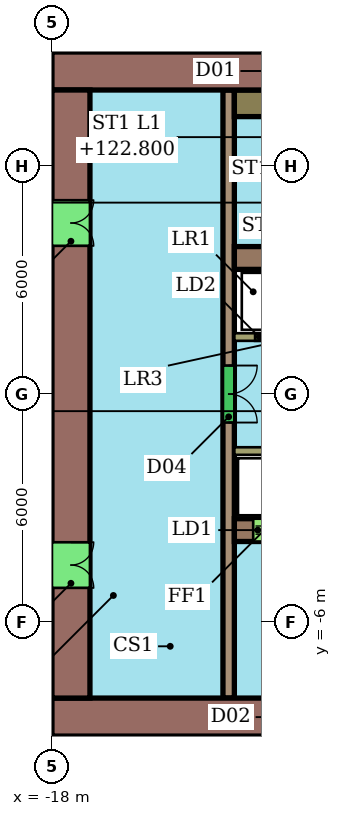
"""IFC4 building model, lengths in metres.
Left out: names, types, materials, properties, quantities, classifications, styles, units other than length and angle.
Written with IfcOpenShell. Run it as: python <this file> out.ifc"""

import sys

from ifc_helpers import new_model, si_unit, direction, frame, frame_2d, origin, place, context, subcontext, project, spatial, rectangle, extrude, element, fill, save


model = new_model("IFC4")
c1 = context("Model", 3, precision=1e-05, world=origin(), true_north=direction((0.0, 1.0)))
c2 = subcontext(c1, "Body", "Model", "MODEL_VIEW")
j1 = project(units=[si_unit("LENGTHUNIT", "METRE"), si_unit("PLANEANGLEUNIT", "RADIAN")], contexts=[c1])
p1 = place(None, origin())
s1 = spatial("IfcSite", under=j1, at=p1, CompositionType="ELEMENT")
p2 = place(p1, origin())
s2 = spatial("IfcBuilding", under=s1, at=p2, CompositionType="ELEMENT")
p3 = place(p2, frame((0.0, 0.0, 121.0)))
s3 = spatial("IfcBuildingStorey", under=s2, at=p3, CompositionType="ELEMENT", Elevation=121.0)
p4 = place(p3, frame((-6.0, 8.5, 0.0), z_axis=(0.0, 0.0, 1.0), x_axis=(-1.0, 0.0, 0.0)))
e1 = element("IfcWall", 1, at=p4, inside=s3, PredefinedType="SHEAR", context=c2, shape_type="SweptSolid", body=[
    extrude(rectangle(XDim=12.0, YDim=1.0, at=frame_2d((6.0, 0.0))), origin(), (0.0, 0.0, 1.0), 3.3),
])
p5 = place(p4, frame((5.2, 0.0, 0.0)))
e2 = element("IfcOpeningElement", 2, at=p5, cuts=e1, PredefinedType="OPENING", context=c2, shape_type="SweptSolid", body=[
    extrude(rectangle(XDim=1.2, YDim=2.1, at=frame_2d((0.6, 1.05))), frame((0.0, 0.51, 0.0), z_axis=(0.0, -1.0, 0.0), x_axis=(1.0, 0.0, 0.0)), (0.0, 0.0, 1.0), 1.02),
])
p6 = place(p3, frame((-18.0, -8.5, 0.0), z_axis=(0.0, 0.0, 1.0), x_axis=(1.0, 0.0, 0.0)))
e3 = element("IfcWall", 3, at=p6, inside=s3, PredefinedType="SHEAR", context=c2, shape_type="SweptSolid", body=[
    extrude(rectangle(XDim=24.0, YDim=1.0, at=frame_2d((12.0, 0.0))), origin(), (0.0, 0.0, 1.0), 3.3),
])
p7 = place(p6, frame((6.0, 0.0, 0.0)))
e4 = element("IfcOpeningElement", 4, at=p7, cuts=e3, PredefinedType="OPENING", context=c2, shape_type="SweptSolid", body=[
    extrude(rectangle(XDim=1.2, YDim=2.1, at=frame_2d((0.6, 1.05))), frame((0.0, 0.51, 0.0), z_axis=(0.0, -1.0, 0.0), x_axis=(1.0, 0.0, 0.0)), (0.0, 0.0, 1.0), 1.02),
])
p8 = place(p3, frame((-17.5, 8.0, 0.0), z_axis=(0.0, 0.0, 1.0), x_axis=(0.0, -1.0, 0.0)))
e5 = element("IfcWall", 5, at=p8, inside=s3, PredefinedType="SHEAR", context=c2, shape_type="SweptSolid", body=[
    extrude(rectangle(XDim=16.0, YDim=1.0, at=frame_2d((8.0, 0.0))), origin(), (0.0, 0.0, 1.0), 3.3),
])
p9 = place(p8, frame((11.9, 0.0, 0.0)))
e6 = element("IfcOpeningElement", 6, at=p9, cuts=e5, PredefinedType="OPENING", context=c2, shape_type="SweptSolid", body=[
    extrude(rectangle(XDim=1.2, YDim=2.1, at=frame_2d((0.6, 1.05))), frame((0.0, 0.51, 0.0), z_axis=(0.0, -1.0, 0.0), x_axis=(1.0, 0.0, 0.0)), (0.0, 0.0, 1.0), 1.02),
])
p10 = place(p8, frame((2.9, 0.0, 0.0)))
e7 = element("IfcOpeningElement", 7, at=p10, cuts=e5, PredefinedType="OPENING", context=c2, shape_type="SweptSolid", body=[
    extrude(rectangle(XDim=1.2, YDim=2.1, at=frame_2d((0.6, 1.05))), frame((0.0, 0.51, 0.0), z_axis=(0.0, -1.0, 0.0), x_axis=(1.0, 0.0, 0.0)), (0.0, 0.0, 1.0), 1.02),
])
p11 = place(p3, frame((-13.2, 3.58, 0.0), z_axis=(0.0, 0.0, 1.0), x_axis=(1.0, 0.0, 0.0)))
e8 = element("IfcWall", 8, at=p11, inside=s3, PredefinedType="SHEAR", context=c2, shape_type="SweptSolid", body=[
    extrude(rectangle(XDim=7.2, YDim=0.6, at=frame_2d((3.6, 0.0))), origin(), (0.0, 0.0, 1.0), 3.3),
])
p12 = place(p3, frame((-13.2, -3.58, 0.0), z_axis=(0.0, 0.0, 1.0), x_axis=(1.0, 0.0, 0.0)))
e9 = element("IfcWall", 9, at=p12, inside=s3, PredefinedType="SHEAR", context=c2, shape_type="SweptSolid", body=[
    extrude(rectangle(XDim=7.2, YDim=0.6, at=frame_2d((3.6, 0.0))), origin(), (0.0, 0.0, 1.0), 3.3),
])
p13 = place(p12, frame((0.496, 0.0, 0.0)))
e10 = element("IfcOpeningElement", 10, at=p13, cuts=e9, PredefinedType="OPENING", context=c2, shape_type="SweptSolid", body=[
    extrude(rectangle(XDim=1.2, YDim=2.1, at=frame_2d((0.6, 1.05))), frame((0.0, 0.31, 0.0), z_axis=(0.0, -1.0, 0.0), x_axis=(1.0, 0.0, 0.0)), (0.0, 0.0, 1.0), 0.62),
])
p14 = place(p12, frame((2.938, 0.0, 0.0)))
e11 = element("IfcOpeningElement", 11, at=p14, cuts=e9, PredefinedType="OPENING", context=c2, shape_type="SweptSolid", body=[
    extrude(rectangle(XDim=1.2, YDim=2.1, at=frame_2d((0.6, 1.05))), frame((0.0, 0.31, 0.0), z_axis=(0.0, -1.0, 0.0), x_axis=(1.0, 0.0, 0.0)), (0.0, 0.0, 1.0), 0.62),
])
p15 = place(p3, frame((-13.35, 8.0, 0.0), z_axis=(0.0, 0.0, 1.0), x_axis=(0.0, -1.0, 0.0)))
e12 = element("IfcWall", 12, at=p15, inside=s3, PredefinedType="SHEAR", context=c2, shape_type="SweptSolid", body=[
    extrude(rectangle(XDim=16.0, YDim=0.3, at=frame_2d((8.0, 0.0))), origin(), (0.0, 0.0, 1.0), 3.3),
])
p16 = place(p15, frame((7.25, 0.0, 0.0)))
e13 = element("IfcOpeningElement", 13, at=p16, cuts=e12, PredefinedType="OPENING", context=c2, shape_type="SweptSolid", body=[
    extrude(rectangle(XDim=1.5, YDim=2.1, at=frame_2d((0.75, 1.05))), frame((0.0, 0.16, 0.0), z_axis=(0.0, -1.0, 0.0), x_axis=(1.0, 0.0, 0.0)), (0.0, 0.0, 1.0), 0.32),
])
p17 = place(p3, frame((-13.2, 1.5, 0.0), z_axis=(0.0, 0.0, 1.0), x_axis=(1.0, 0.0, 0.0)))
e14 = element("IfcWall", 14, at=p17, inside=s3, PredefinedType="SHEAR", context=c2, shape_type="SweptSolid", body=[
    extrude(rectangle(XDim=14.4, YDim=0.2, at=frame_2d((7.2, 0.0))), origin(), (0.0, 0.0, 1.0), 3.3),
])
p18 = place(p17, frame((0.546, 0.0, 0.0)))
e15 = element("IfcOpeningElement", 15, at=p18, cuts=e14, PredefinedType="OPENING", context=c2, shape_type="SweptSolid", body=[
    extrude(rectangle(XDim=1.1, YDim=2.1, at=frame_2d((0.55, 1.05))), frame((0.0, 0.11, 0.0), z_axis=(0.0, -1.0, 0.0), x_axis=(1.0, 0.0, 0.0)), (0.0, 0.0, 1.0), 0.22),
])
p19 = place(p17, frame((2.988, 0.0, 0.0)))
e16 = element("IfcOpeningElement", 16, at=p19, cuts=e14, PredefinedType="OPENING", context=c2, shape_type="SweptSolid", body=[
    extrude(rectangle(XDim=1.1, YDim=2.1, at=frame_2d((0.55, 1.05))), frame((0.0, 0.11, 0.0), z_axis=(0.0, -1.0, 0.0), x_axis=(1.0, 0.0, 0.0)), (0.0, 0.0, 1.0), 0.22),
])
p20 = place(p17, frame((5.429, 0.0, 0.0)))
e17 = element("IfcOpeningElement", 17, at=p20, cuts=e14, PredefinedType="OPENING", context=c2, shape_type="SweptSolid", body=[
    extrude(rectangle(XDim=1.1, YDim=2.1, at=frame_2d((0.55, 1.05))), frame((0.0, 0.11, 0.0), z_axis=(0.0, -1.0, 0.0), x_axis=(1.0, 0.0, 0.0)), (0.0, 0.0, 1.0), 0.22),
])
p21 = place(p17, frame((7.871, 0.0, 0.0)))
e18 = element("IfcOpeningElement", 18, at=p21, cuts=e14, PredefinedType="OPENING", context=c2, shape_type="SweptSolid", body=[
    extrude(rectangle(XDim=1.1, YDim=2.1, at=frame_2d((0.55, 1.05))), frame((0.0, 0.11, 0.0), z_axis=(0.0, -1.0, 0.0), x_axis=(1.0, 0.0, 0.0)), (0.0, 0.0, 1.0), 0.22),
])
p22 = place(p17, frame((10.21, 0.0, 0.0)))
e19 = element("IfcOpeningElement", 19, at=p22, cuts=e14, PredefinedType="OPENING", context=c2, shape_type="SweptSolid", body=[
    extrude(rectangle(XDim=1.0, YDim=2.1, at=frame_2d((0.5, 1.05))), frame((0.0, 0.11, 0.0), z_axis=(0.0, -1.0, 0.0), x_axis=(1.0, 0.0, 0.0)), (0.0, 0.0, 1.0), 0.22),
])
p23 = place(p17, frame((13.35, 0.0, 0.0)))
e20 = element("IfcOpeningElement", 20, at=p23, cuts=e14, PredefinedType="OPENING", context=c2, shape_type="SweptSolid", body=[
    extrude(rectangle(XDim=0.9, YDim=2.1, at=frame_2d((0.45, 1.05))), frame((0.0, 0.11, 0.0), z_axis=(0.0, -1.0, 0.0), x_axis=(1.0, 0.0, 0.0)), (0.0, 0.0, 1.0), 0.22),
])
p24 = place(p3, frame((1.2, -1.5, 0.0), z_axis=(0.0, 0.0, 1.0), x_axis=(-1.0, 0.0, 0.0)))
e21 = element("IfcWall", 21, at=p24, inside=s3, PredefinedType="SHEAR", context=c2, shape_type="SweptSolid", body=[
    extrude(rectangle(XDim=14.4, YDim=0.2, at=frame_2d((7.2, 0.0))), origin(), (0.0, 0.0, 1.0), 3.3),
])
p25 = place(p24, frame((7.821, 0.0, 0.0)))
e22 = element("IfcOpeningElement", 22, at=p25, cuts=e21, PredefinedType="OPENING", context=c2, shape_type="SweptSolid", body=[
    extrude(rectangle(XDim=1.2, YDim=2.1, at=frame_2d((0.6, 1.05))), frame((0.0, 0.11, 0.0), z_axis=(0.0, -1.0, 0.0), x_axis=(1.0, 0.0, 0.0)), (0.0, 0.0, 1.0), 0.22),
])
p26 = place(p24, frame((0.15, 0.0, 0.0)))
e23 = element("IfcOpeningElement", 23, at=p26, cuts=e21, PredefinedType="OPENING", context=c2, shape_type="SweptSolid", body=[
    extrude(rectangle(XDim=0.9, YDim=2.1, at=frame_2d((0.45, 1.05))), frame((0.0, 0.11, 0.0), z_axis=(0.0, -1.0, 0.0), x_axis=(1.0, 0.0, 0.0)), (0.0, 0.0, 1.0), 0.22),
])
p27 = place(p3, frame((-13.2, 7.65, 0.0), z_axis=(0.0, 0.0, 1.0), x_axis=(1.0, 0.0, 0.0)))
e24 = element("IfcWall", 24, at=p27, inside=s3, PredefinedType="SHEAR", context=c2, shape_type="SweptSolid", body=[
    extrude(rectangle(XDim=0.8, YDim=0.7, at=frame_2d((0.4, 0.0))), origin(), (0.0, 0.0, 1.0), 3.3),
])
p28 = place(p9, origin())
e25 = element("IfcDoor", 25, at=p28, inside=s3, OperationType="DOUBLE_DOOR_SINGLE_SWING", PredefinedType="NOTDEFINED", context=c2, shape_type="SweptSolid", body=[
    extrude(rectangle(XDim=1.2, YDim=2.1, at=frame_2d((0.6, 1.05))), frame((0.0, 0.025, 0.0), z_axis=(0.0, -1.0, 0.0), x_axis=(1.0, 0.0, 0.0)), (0.0, 0.0, 1.0), 0.05),
])
fill(e6, e25)
p29 = place(p10, origin())
e26 = element("IfcDoor", 26, at=p29, inside=s3, OperationType="DOUBLE_DOOR_SINGLE_SWING", PredefinedType="NOTDEFINED", context=c2, shape_type="SweptSolid", body=[
    extrude(rectangle(XDim=1.2, YDim=2.1, at=frame_2d((0.6, 1.05))), frame((0.0, 0.025, 0.0), z_axis=(0.0, -1.0, 0.0), x_axis=(1.0, 0.0, 0.0)), (0.0, 0.0, 1.0), 0.05),
])
fill(e7, e26)
p30 = place(p13, origin())
e27 = element("IfcDoor", 27, at=p30, inside=s3, OperationType="DOUBLE_DOOR_SLIDING", PredefinedType="NOTDEFINED", context=c2, shape_type="SweptSolid", body=[
    extrude(rectangle(XDim=1.2, YDim=2.1, at=frame_2d((0.6, 1.05))), frame((0.0, 0.025, 0.0), z_axis=(0.0, -1.0, 0.0), x_axis=(1.0, 0.0, 0.0)), (0.0, 0.0, 1.0), 0.05),
])
fill(e10, e27)
p31 = place(p16, origin())
e28 = element("IfcDoor", 28, at=p31, inside=s3, OperationType="DOUBLE_DOOR_SINGLE_SWING", PredefinedType="NOTDEFINED", context=c2, shape_type="SweptSolid", body=[
    extrude(rectangle(XDim=1.5, YDim=2.1, at=frame_2d((0.75, 1.05))), frame((0.0, 0.025, 0.0), z_axis=(0.0, -1.0, 0.0), x_axis=(1.0, 0.0, 0.0)), (0.0, 0.0, 1.0), 0.05),
])
fill(e13, e28)
p32 = place(p18, origin())
e29 = element("IfcDoor", 29, at=p32, inside=s3, OperationType="DOUBLE_DOOR_SLIDING", PredefinedType="NOTDEFINED", context=c2, shape_type="SweptSolid", body=[
    extrude(rectangle(XDim=1.1, YDim=2.1, at=frame_2d((0.55, 1.05))), frame((0.0, 0.025, 0.0), z_axis=(0.0, -1.0, 0.0), x_axis=(1.0, 0.0, 0.0)), (0.0, 0.0, 1.0), 0.05),
])
fill(e15, e29)
save(model, sys.argv[1])
